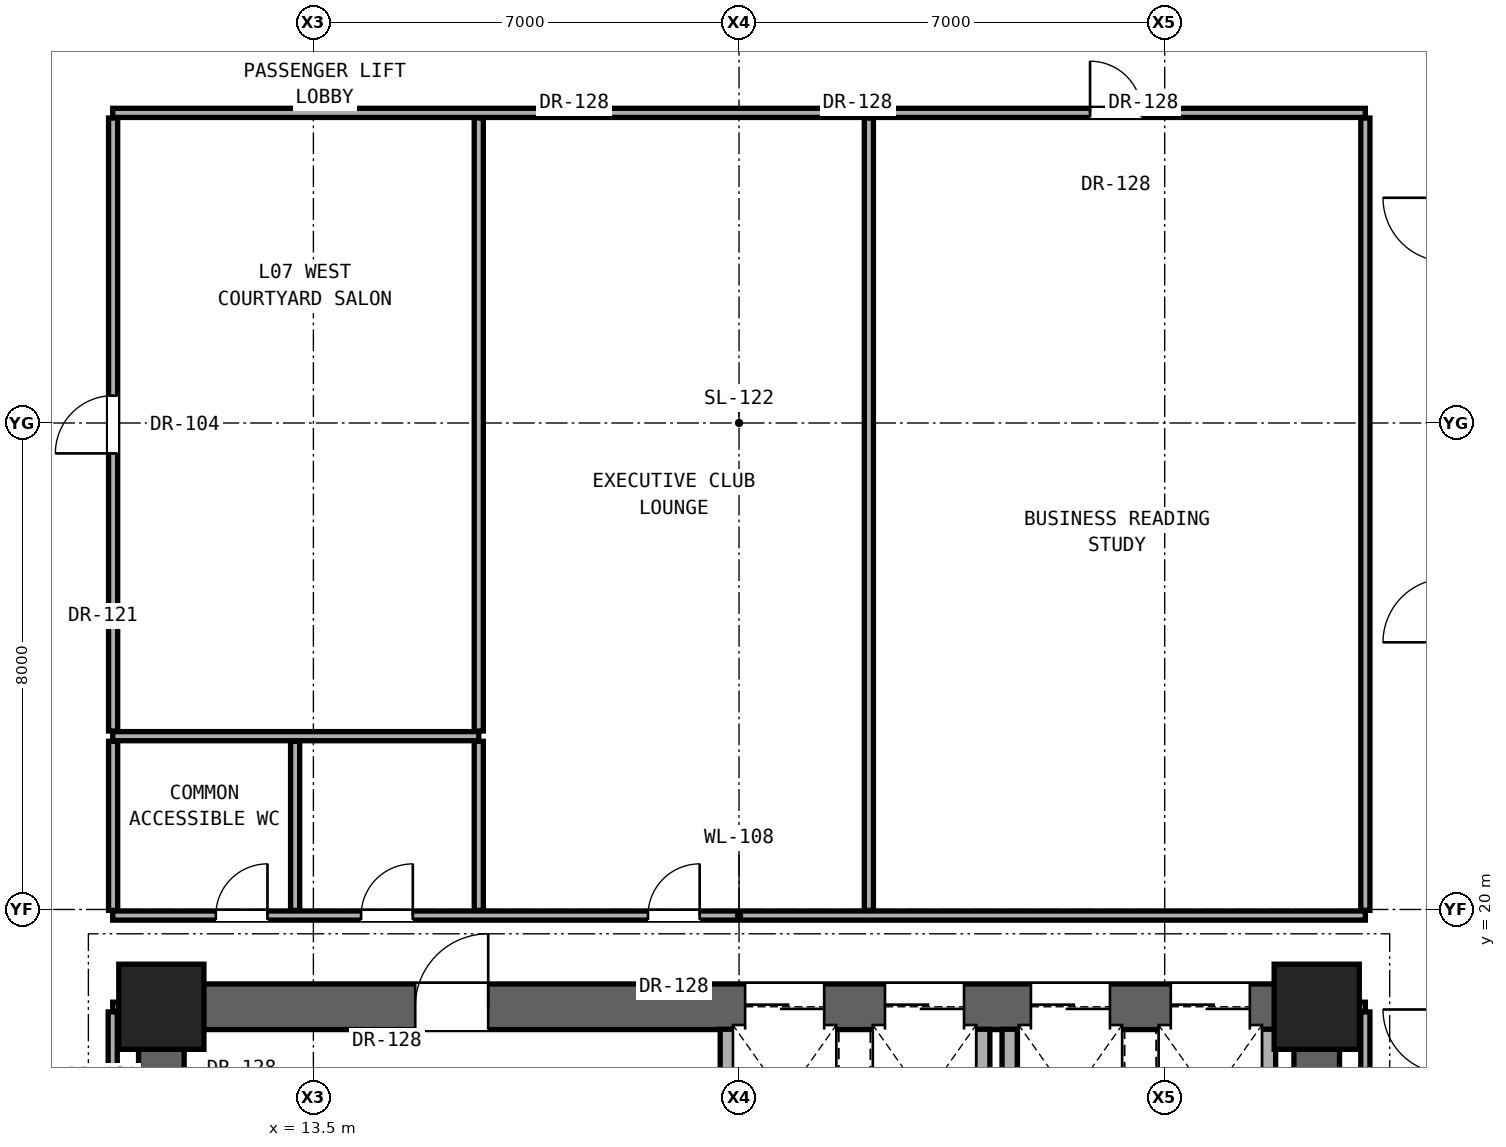
"""IFC4 building model, lengths in metres.
Left out: names, types, materials, properties, quantities, classifications, styles, units other than length and angle.
Written with IfcOpenShell. Run it as: python <this file> out.ifc"""

import sys

from ifc_helpers import new_model, si_unit, direction, frame, frame_2d, origin, origin_2d, place, context, subcontext, project, spatial, rectangle, extrude, element, fill, save


model = new_model("IFC4")
c1 = context("Model", 3, precision=1e-05, world=origin(), true_north=direction((0.0, 1.0)))
c2 = subcontext(c1, "Body", "Model", "MODEL_VIEW")
j1 = project(units=[si_unit("LENGTHUNIT", "METRE"), si_unit("PLANEANGLEUNIT", "RADIAN")], contexts=[c1])
p1 = place(None, origin())
s1 = spatial("IfcSite", under=j1, at=p1, CompositionType="ELEMENT")
p2 = place(p1, origin())
s2 = spatial("IfcBuilding", under=s1, at=p2, CompositionType="ELEMENT")
p3 = place(p2, frame((0.0, 0.0, 29.0)))
s3 = spatial("IfcBuildingStorey", under=s2, at=p3, CompositionType="ELEMENT", Elevation=29.0)
for number, where, z_axis, x_axis in (
    (1, (11.0, 18.4, 0.0), (0.0, 0.0, 1.0), (1.0, 0.0, 0.0)),
    (2, (30.0, 18.4, 0.0), (0.0, 0.0, 1.0), (1.0, 0.0, 0.0)),
):
    element("IfcColumn", number, at=place(p3, frame(where, z_axis=z_axis, x_axis=x_axis)), inside=s3, PredefinedType="COLUMN", context=c2, shape_type="SweptSolid", body=[
        extrude(rectangle(XDim=1.4, YDim=1.4, at=origin_2d()), origin(), (0.0, 0.0, 1.0), 3.3),
    ])
for number, where, z_axis, x_axis in (
    (3, (11.0, 12.4, 0.0), (0.0, 0.0, 1.0), (0.0, 1.0, 0.0)),
    (4, (30.0, 12.4, 0.0), (0.0, 0.0, 1.0), (0.0, 1.0, 0.0)),
):
    element("IfcWall", number, at=place(p3, frame(where, z_axis=z_axis, x_axis=x_axis)), inside=s3, PredefinedType="SHEAR", context=c2, shape_type="SweptSolid", body=[
        extrude(rectangle(XDim=6.0, YDim=0.75, at=frame_2d((3.0, 0.0))), origin(), (0.0, 0.0, 1.0), 3.06),
    ])
p4 = place(p3, frame((11.0, 18.4, 0.0), z_axis=(0.0, 0.0, 1.0), x_axis=(1.0, 0.0, 0.0)))
e5 = element("IfcWall", 5, at=p4, inside=s3, PredefinedType="SHEAR", context=c2, shape_type="SweptSolid", body=[
    extrude(rectangle(XDim=19.0, YDim=0.75, at=frame_2d((9.5, 0.0))), origin(), (0.0, 0.0, 1.0), 3.06),
])
p5 = place(p4, frame((4.175, 0.0, 0.0)))
e6 = element("IfcOpeningElement", 6, at=p5, cuts=e5, PredefinedType="OPENING", context=c2, shape_type="SweptSolid", body=[
    extrude(rectangle(XDim=1.2, YDim=2.25, at=frame_2d((0.6, 1.125))), frame((0.0, 0.385, 0.0), z_axis=(0.0, -1.0, 0.0), x_axis=(1.0, 0.0, 0.0)), (0.0, 0.0, 1.0), 0.77),
])
p6 = place(p4, frame((9.6, 0.0, 0.0)))
e7 = element("IfcOpeningElement", 7, at=p6, cuts=e5, PredefinedType="OPENING", context=c2, shape_type="SweptSolid", body=[
    extrude(rectangle(XDim=1.3, YDim=2.3, at=frame_2d((0.65, 1.15))), frame((0.0, 0.385, 0.0), z_axis=(0.0, -1.0, 0.0), x_axis=(1.0, 0.0, 0.0)), (0.0, 0.0, 1.0), 0.77),
])
p7 = place(p4, frame((11.9, 0.0, 0.0)))
e8 = element("IfcOpeningElement", 8, at=p7, cuts=e5, PredefinedType="OPENING", context=c2, shape_type="SweptSolid", body=[
    extrude(rectangle(XDim=1.3, YDim=2.3, at=frame_2d((0.65, 1.15))), frame((0.0, 0.385, 0.0), z_axis=(0.0, -1.0, 0.0), x_axis=(1.0, 0.0, 0.0)), (0.0, 0.0, 1.0), 0.77),
])
p8 = place(p4, frame((14.3, 0.0, 0.0)))
e9 = element("IfcOpeningElement", 9, at=p8, cuts=e5, PredefinedType="OPENING", context=c2, shape_type="SweptSolid", body=[
    extrude(rectangle(XDim=1.3, YDim=2.3, at=frame_2d((0.65, 1.15))), frame((0.0, 0.385, 0.0), z_axis=(0.0, -1.0, 0.0), x_axis=(1.0, 0.0, 0.0)), (0.0, 0.0, 1.0), 0.77),
])
p9 = place(p4, frame((16.6, 0.0, 0.0)))
e10 = element("IfcOpeningElement", 10, at=p9, cuts=e5, PredefinedType="OPENING", context=c2, shape_type="SweptSolid", body=[
    extrude(rectangle(XDim=1.3, YDim=2.3, at=frame_2d((0.65, 1.15))), frame((0.0, 0.385, 0.0), z_axis=(0.0, -1.0, 0.0), x_axis=(1.0, 0.0, 0.0)), (0.0, 0.0, 1.0), 0.77),
])
for number, where, z_axis, x_axis in (
    (11, (10.2, 18.4, 0.0), (0.0, 0.0, 1.0), (1.0, 0.0, 0.0)),
    (12, (30.37, 18.4, 0.0), (0.0, 0.0, 1.0), (1.0, 0.0, 0.0)),
):
    element("IfcWall", number, at=place(p3, frame(where, z_axis=z_axis, x_axis=x_axis)), inside=s3, PredefinedType="PARTITIONING", context=c2, shape_type="SweptSolid", body=[
        extrude(rectangle(XDim=0.43, YDim=0.15, at=frame_2d((0.215, 0.0))), origin(), (0.0, 0.0, 1.0), 2.436),
    ])
p10 = place(p3, frame((10.2, 19.9, 0.0), z_axis=(0.0, 0.0, 1.0), x_axis=(1.0, 0.0, 0.0)))
e13 = element("IfcWall", 13, at=p10, inside=s3, PredefinedType="PARTITIONING", context=c2, shape_type="SweptSolid", body=[
    extrude(rectangle(XDim=20.6, YDim=0.15, at=frame_2d((10.3, 0.0))), origin(), (0.0, 0.0, 1.0), 2.104),
])
p11 = place(p10, frame((1.695, 0.0, 0.0)))
e14 = element("IfcOpeningElement", 14, at=p11, cuts=e13, PredefinedType="OPENING", context=c2, shape_type="SweptSolid", body=[
    extrude(rectangle(XDim=0.85, YDim=2.01, at=frame_2d((0.425, 1.005))), frame((0.0, 0.085, 0.0), z_axis=(0.0, -1.0, 0.0), x_axis=(1.0, 0.0, 0.0)), (0.0, 0.0, 1.0), 0.17),
])
p12 = place(p10, frame((4.085, 0.0, 0.0)))
e15 = element("IfcOpeningElement", 15, at=p12, cuts=e13, PredefinedType="OPENING", context=c2, shape_type="SweptSolid", body=[
    extrude(rectangle(XDim=0.85, YDim=2.01, at=frame_2d((0.425, 1.005))), frame((0.0, 0.085, 0.0), z_axis=(0.0, -1.0, 0.0), x_axis=(1.0, 0.0, 0.0)), (0.0, 0.0, 1.0), 0.17),
])
p13 = place(p10, frame((8.802, 0.0, 0.0)))
e16 = element("IfcOpeningElement", 16, at=p13, cuts=e13, PredefinedType="OPENING", context=c2, shape_type="SweptSolid", body=[
    extrude(rectangle(XDim=0.85, YDim=2.01, at=frame_2d((0.425, 1.005))), frame((0.0, 0.085, 0.0), z_axis=(0.0, -1.0, 0.0), x_axis=(1.0, 0.0, 0.0)), (0.0, 0.0, 1.0), 0.17),
])
p14 = place(p3, frame((10.2, 22.85, 0.0), z_axis=(0.0, 0.0, 1.0), x_axis=(1.0, 0.0, 0.0)))
e17 = element("IfcWall", 17, at=p14, inside=s3, PredefinedType="PARTITIONING", context=c2, shape_type="SweptSolid", body=[
    extrude(rectangle(XDim=6.02, YDim=0.15, at=frame_2d((3.01, 0.0))), origin(), (0.0, 0.0, 1.0), 2.104),
])
p15 = place(p3, frame((10.2, 33.1, 0.0), z_axis=(0.0, 0.0, 1.0), x_axis=(1.0, 0.0, 0.0)))
e18 = element("IfcWall", 18, at=p15, inside=s3, PredefinedType="PARTITIONING", context=c2, shape_type="SweptSolid", body=[
    extrude(rectangle(XDim=20.6, YDim=0.15, at=frame_2d((10.3, 0.0))), origin(), (0.0, 0.0, 1.0), 2.104),
])
p16 = place(p15, frame((16.073, 0.0, 0.0)))
e19 = element("IfcOpeningElement", 19, at=p16, cuts=e18, PredefinedType="OPENING", context=c2, shape_type="SweptSolid", body=[
    extrude(rectangle(XDim=0.85, YDim=2.01, at=frame_2d((0.425, 1.005))), frame((0.0, 0.085, 0.0), z_axis=(0.0, -1.0, 0.0), x_axis=(1.0, 0.0, 0.0)), (0.0, 0.0, 1.0), 0.17),
])
p17 = place(p3, frame((10.2, 12.335, 0.0), z_axis=(0.0, 0.0, 1.0), x_axis=(0.0, 1.0, 0.0)))
e20 = element("IfcWall", 20, at=p17, inside=s3, PredefinedType="PARTITIONING", context=c2, shape_type="SweptSolid", body=[
    extrude(rectangle(XDim=5.98, YDim=0.15, at=frame_2d((2.99, 0.0))), origin(), (0.0, 0.0, 1.0), 2.436),
])
p18 = place(p3, frame((10.207, 19.985, 0.0), z_axis=(0.0, 0.0, 1.0), x_axis=(0.0, 1.0, 0.0)))
e21 = element("IfcWall", 21, at=p18, inside=s3, PredefinedType="PARTITIONING", context=c2, shape_type="SweptSolid", body=[
    extrude(rectangle(XDim=2.78, YDim=0.15, at=frame_2d((1.39, 0.0))), origin(), (0.0, 0.0, 1.0), 3.06),
])
p19 = place(p3, frame((10.207, 22.935, 0.0), z_axis=(0.0, 0.0, 1.0), x_axis=(0.0, 1.0, 0.0)))
e22 = element("IfcWall", 22, at=p19, inside=s3, PredefinedType="PARTITIONING", context=c2, shape_type="SweptSolid", body=[
    extrude(rectangle(XDim=10.08, YDim=0.15, at=frame_2d((5.04, 0.0))), origin(), (0.0, 0.0, 1.0), 2.279),
])
p20 = place(p19, frame((4.565, 0.0, 0.0)))
e23 = element("IfcOpeningElement", 23, at=p20, cuts=e22, PredefinedType="OPENING", context=c2, shape_type="SweptSolid", body=[
    extrude(rectangle(XDim=0.95, YDim=2.15, at=frame_2d((0.475, 1.075))), frame((0.0, 0.085, 0.0), z_axis=(0.0, -1.0, 0.0), x_axis=(1.0, 0.0, 0.0)), (0.0, 0.0, 1.0), 0.17),
])
for number, where, z_axis, x_axis in (
    (24, (13.2, 19.985, 0.0), (0.0, 0.0, 1.0), (0.0, 1.0, 0.0)),
    (25, (16.22, 19.985, 0.0), (0.0, 0.0, 1.0), (0.0, 1.0, 0.0)),
):
    element("IfcWall", number, at=place(p3, frame(where, z_axis=z_axis, x_axis=x_axis)), inside=s3, PredefinedType="PARTITIONING", context=c2, shape_type="SweptSolid", body=[
        extrude(rectangle(XDim=2.78, YDim=0.15, at=frame_2d((1.39, 0.0))), origin(), (0.0, 0.0, 1.0), 3.06),
    ])
p21 = place(p3, frame((16.22, 22.935, 0.0), z_axis=(0.0, 0.0, 1.0), x_axis=(0.0, 1.0, 0.0)))
e26 = element("IfcWall", 26, at=p21, inside=s3, PredefinedType="PARTITIONING", context=c2, shape_type="SweptSolid", body=[
    extrude(rectangle(XDim=10.08, YDim=0.15, at=frame_2d((5.04, 0.0))), origin(), (0.0, 0.0, 1.0), 2.104),
])
p22 = place(p3, frame((20.315, 16.555, 0.0), z_axis=(0.0, 0.0, 1.0), x_axis=(0.0, 1.0, 0.0)))
e27 = element("IfcWall", 27, at=p22, inside=s3, PredefinedType="SOLIDWALL", context=c2, shape_type="SweptSolid", body=[
    extrude(rectangle(XDim=1.475, YDim=0.25, at=frame_2d((0.738, 0.0))), origin(), (0.0, 0.0, 1.0), 3.06),
])
p23 = place(p3, frame((22.635, 19.985, 0.0), z_axis=(0.0, 0.0, 1.0), x_axis=(0.0, 1.0, 0.0)))
e28 = element("IfcWall", 28, at=p23, inside=s3, PredefinedType="PARTITIONING", context=c2, shape_type="SweptSolid", body=[
    extrude(rectangle(XDim=13.03, YDim=0.15, at=frame_2d((6.515, 0.0))), origin(), (0.0, 0.0, 1.0), 2.104),
])
for number, where, z_axis, x_axis in (
    (29, (24.5, 15.785, 0.0), (0.0, 0.0, 1.0), (0.0, 1.0, 0.0)),
    (30, (24.95, 15.785, 0.0), (0.0, 0.0, 1.0), (0.0, 1.0, 0.0)),
    (31, (29.2, 15.785, 0.0), (0.0, 0.0, 1.0), (0.0, 1.0, 0.0)),
):
    element("IfcWall", number, at=place(p3, frame(where, z_axis=z_axis, x_axis=x_axis)), inside=s3, PredefinedType="SOLIDWALL", context=c2, shape_type="SweptSolid", body=[
        extrude(rectangle(XDim=2.245, YDim=0.25, at=frame_2d((1.123, 0.0))), origin(), (0.0, 0.0, 1.0), 3.06),
    ])
p24 = place(p3, frame((30.8, 12.335, 0.0), z_axis=(0.0, 0.0, 1.0), x_axis=(0.0, 1.0, 0.0)))
e32 = element("IfcWall", 32, at=p24, inside=s3, PredefinedType="PARTITIONING", context=c2, shape_type="SweptSolid", body=[
    extrude(rectangle(XDim=5.98, YDim=0.15, at=frame_2d((2.99, 0.0))), origin(), (0.0, 0.0, 1.0), 2.436),
])
p25 = place(p3, frame((30.8, 19.985, 0.0), z_axis=(0.0, 0.0, 1.0), x_axis=(0.0, 1.0, 0.0)))
e33 = element("IfcWall", 33, at=p25, inside=s3, PredefinedType="PARTITIONING", context=c2, shape_type="SweptSolid", body=[
    extrude(rectangle(XDim=13.03, YDim=0.15, at=frame_2d((6.515, 0.0))), origin(), (0.0, 0.0, 1.0), 2.279),
])
p26 = place(p5, origin())
e34 = element("IfcDoor", 34, at=p26, inside=s3, OperationType="SINGLE_SWING_RIGHT", PredefinedType="DOOR", context=c2, shape_type="SweptSolid", body=[
    extrude(rectangle(XDim=1.2, YDim=2.25, at=frame_2d((0.6, 1.125))), frame((0.0, 0.025, 0.0), z_axis=(0.0, -1.0, 0.0), x_axis=(1.0, 0.0, 0.0)), (0.0, 0.0, 1.0), 0.05),
])
fill(e6, e34)
p27 = place(p11, origin())
e35 = element("IfcDoor", 35, at=p27, inside=s3, OperationType="SINGLE_SWING_RIGHT", PredefinedType="DOOR", context=c2, shape_type="SweptSolid", body=[
    extrude(rectangle(XDim=0.85, YDim=2.01, at=frame_2d((0.425, 1.005))), frame((0.0, 0.025, 0.0), z_axis=(0.0, -1.0, 0.0), x_axis=(1.0, 0.0, 0.0)), (0.0, 0.0, 1.0), 0.05),
])
fill(e14, e35)
p28 = place(p12, origin())
e36 = element("IfcDoor", 36, at=p28, inside=s3, OperationType="SINGLE_SWING_RIGHT", PredefinedType="DOOR", context=c2, shape_type="SweptSolid", body=[
    extrude(rectangle(XDim=0.85, YDim=2.01, at=frame_2d((0.425, 1.005))), frame((0.0, 0.025, 0.0), z_axis=(0.0, -1.0, 0.0), x_axis=(1.0, 0.0, 0.0)), (0.0, 0.0, 1.0), 0.05),
])
fill(e15, e36)
p29 = place(p20, origin())
e37 = element("IfcDoor", 37, at=p29, inside=s3, OperationType="SINGLE_SWING_LEFT", PredefinedType="DOOR", context=c2, shape_type="SweptSolid", body=[
    extrude(rectangle(XDim=0.95, YDim=2.15, at=frame_2d((0.475, 1.075))), frame((0.0, 0.025, 0.0), z_axis=(0.0, -1.0, 0.0), x_axis=(1.0, 0.0, 0.0)), (0.0, 0.0, 1.0), 0.05),
])
fill(e23, e37)
p30 = place(p13, origin())
e38 = element("IfcDoor", 38, at=p30, inside=s3, OperationType="SINGLE_SWING_RIGHT", PredefinedType="DOOR", context=c2, shape_type="SweptSolid", body=[
    extrude(rectangle(XDim=0.85, YDim=2.01, at=frame_2d((0.425, 1.005))), frame((0.0, 0.025, 0.0), z_axis=(0.0, -1.0, 0.0), x_axis=(1.0, 0.0, 0.0)), (0.0, 0.0, 1.0), 0.05),
])
fill(e16, e38)
p31 = place(p16, origin())
e39 = element("IfcDoor", 39, at=p31, inside=s3, OperationType="SINGLE_SWING_LEFT", PredefinedType="DOOR", context=c2, shape_type="SweptSolid", body=[
    extrude(rectangle(XDim=0.85, YDim=2.01, at=frame_2d((0.425, 1.005))), frame((0.0, 0.025, 0.0), z_axis=(0.0, -1.0, 0.0), x_axis=(1.0, 0.0, 0.0)), (0.0, 0.0, 1.0), 0.05),
])
fill(e19, e39)
p32 = place(p6, origin())
e40 = element("IfcDoor", 40, at=p32, inside=s3, OperationType="DOUBLE_DOOR_SLIDING", PredefinedType="DOOR", context=c2, shape_type="SweptSolid", body=[
    extrude(rectangle(XDim=1.3, YDim=2.3, at=frame_2d((0.65, 1.15))), frame((0.0, 0.025, 0.0), z_axis=(0.0, -1.0, 0.0), x_axis=(1.0, 0.0, 0.0)), (0.0, 0.0, 1.0), 0.05),
])
fill(e7, e40)
p33 = place(p7, origin())
e41 = element("IfcDoor", 41, at=p33, inside=s3, OperationType="DOUBLE_DOOR_SLIDING", PredefinedType="DOOR", context=c2, shape_type="SweptSolid", body=[
    extrude(rectangle(XDim=1.3, YDim=2.3, at=frame_2d((0.65, 1.15))), frame((0.0, 0.025, 0.0), z_axis=(0.0, -1.0, 0.0), x_axis=(1.0, 0.0, 0.0)), (0.0, 0.0, 1.0), 0.05),
])
fill(e8, e41)
p34 = place(p8, origin())
e42 = element("IfcDoor", 42, at=p34, inside=s3, OperationType="DOUBLE_DOOR_SLIDING", PredefinedType="DOOR", context=c2, shape_type="SweptSolid", body=[
    extrude(rectangle(XDim=1.3, YDim=2.3, at=frame_2d((0.65, 1.15))), frame((0.0, 0.025, 0.0), z_axis=(0.0, -1.0, 0.0), x_axis=(1.0, 0.0, 0.0)), (0.0, 0.0, 1.0), 0.05),
])
fill(e9, e42)
p35 = place(p9, origin())
e43 = element("IfcDoor", 43, at=p35, inside=s3, OperationType="DOUBLE_DOOR_SLIDING", PredefinedType="DOOR", context=c2, shape_type="SweptSolid", body=[
    extrude(rectangle(XDim=1.3, YDim=2.3, at=frame_2d((0.65, 1.15))), frame((0.0, 0.025, 0.0), z_axis=(0.0, -1.0, 0.0), x_axis=(1.0, 0.0, 0.0)), (0.0, 0.0, 1.0), 0.05),
])
fill(e10, e43)
save(model, sys.argv[1])
